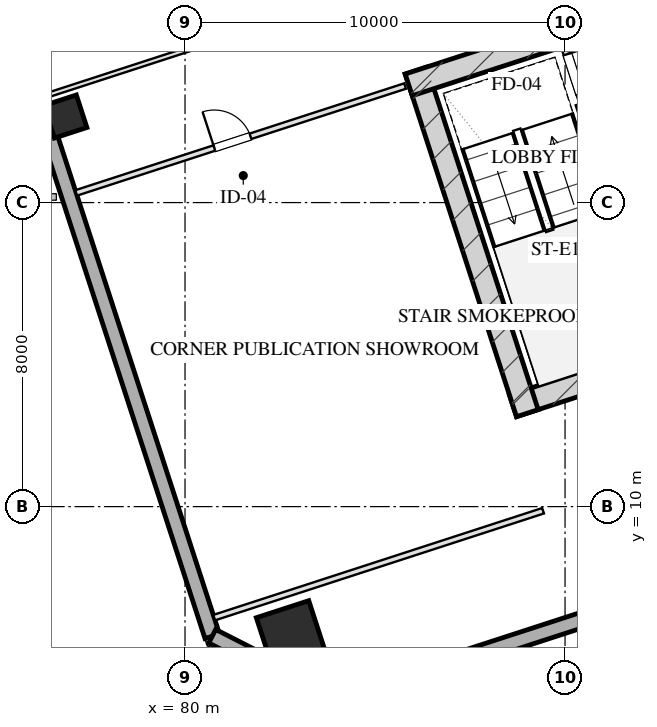
"""IFC4 building model, lengths in metres.
Left out: names, types, materials, properties, quantities, classifications, styles, units other than length and angle.
Written with IfcOpenShell. Run it as: python <this file> out.ifc"""

import sys

from ifc_helpers import new_model, si_unit, direction, frame, frame_2d, origin, origin_2d, place, context, subcontext, project, spatial, rectangle, hollow_rectangle, extrude, element, fill, save


model = new_model("IFC4")
c1 = context("Model", 3, precision=1e-05, world=origin(), true_north=direction((0.0, 1.0)))
c2 = subcontext(c1, "Body", "Model", "MODEL_VIEW")
j1 = project(units=[si_unit("LENGTHUNIT", "METRE"), si_unit("PLANEANGLEUNIT", "RADIAN")], contexts=[c1])
p1 = place(None, origin())
s1 = spatial("IfcSite", under=j1, at=p1, CompositionType="ELEMENT")
p2 = place(p1, origin())
s2 = spatial("IfcBuilding", under=s1, at=p2, CompositionType="ELEMENT")
p3 = place(p2, frame((0.0, 0.0, 120.75)))
s3 = spatial("IfcBuildingStorey", under=s2, at=p3, CompositionType="ELEMENT", Elevation=120.75)
p4 = place(p3, frame((88.63, 12.652, 0.0), z_axis=(0.0, 0.0, 1.0), x_axis=(0.95105714907, 0.309015046886, 0.0)))
e1 = element("IfcWall", 1, at=p4, inside=s3, PredefinedType="SHEAR", context=c2, shape_type="SweptSolid", body=[
    extrude(rectangle(XDim=16.4, YDim=0.6, at=frame_2d((8.2, 0.0))), origin(), (0.0, 0.0, 1.0), 3.45),
])
p5 = place(p3, frame((86.078, 21.475, 0.0), z_axis=(0.0, 0.0, 1.0), x_axis=(0.309017938678, -0.951056209472, 0.0)))
e2 = element("IfcWall", 2, at=p5, inside=s3, PredefinedType="SHEAR", context=c2, shape_type="SweptSolid", body=[
    extrude(rectangle(XDim=9.48, YDim=0.6, at=frame_2d((4.74, 0.0))), origin(), (0.0, 0.0, 1.0), 3.45),
])
p6 = place(p3, frame((85.886, 21.097, 0.0), z_axis=(0.0, 0.0, 1.0), x_axis=(0.951068073652, 0.308981422225, 0.0)))
e3 = element("IfcWall", 3, at=p6, inside=s3, PredefinedType="SHEAR", context=c2, shape_type="SweptSolid", body=[
    extrude(rectangle(XDim=4.22, YDim=0.6, at=frame_2d((2.11, 0.0))), origin(), (0.0, 0.0, 1.0), 3.45),
])
p7 = place(p3, frame((82.791, 6.612, 0.0), z_axis=(0.0, 0.0, 1.0), x_axis=(0.951056516295, 0.309016994375, 0.0)))
e4 = element("IfcColumn", 4, at=p7, inside=s3, PredefinedType="COLUMN", context=c2, shape_type="SweptSolid", body=[
    extrude(hollow_rectangle(XDim=1.45, YDim=1.45, WallThickness=0.05, at=origin_2d()), origin(), (0.0, 0.0, 1.0), 3.451),
])
p8 = place(p3, frame((76.851, 20.264, 0.0), z_axis=(0.0, 0.0, 1.0), x_axis=(0.951056516295, 0.309016994375, 0.0)))
e5 = element("IfcColumn", 5, at=p8, inside=s3, PredefinedType="COLUMN", context=c2, shape_type="SweptSolid", body=[
    extrude(hollow_rectangle(XDim=0.9, YDim=0.9, WallThickness=0.032, at=origin_2d()), origin(), (0.0, 0.0, 1.0), 3.451),
])
p9 = place(p3, frame((80.716, 6.59, 0.0), z_axis=(0.0, 0.0, 1.0), x_axis=(-0.309017542002, 0.95105633836, 0.0)))
e6 = element("IfcWall", 6, at=p9, inside=s3, PredefinedType="SOLIDWALL", context=c2, shape_type="SweptSolid", body=[
    extrude(rectangle(XDim=46.4, YDim=0.4, at=frame_2d((23.2, 0.0))), origin(), (0.0, 0.0, 1.0), 2.61),
])
p10 = place(p9, frame((15.6, 0.0, 0.75)))
e7 = element("IfcOpeningElement", 7, at=p10, cuts=e6, PredefinedType="OPENING", context=c2, shape_type="SweptSolid", body=[
    extrude(rectangle(XDim=2.4, YDim=1.46, at=frame_2d((1.2, 0.73))), frame((0.0, 0.21, 0.0), z_axis=(0.0, -1.0, 0.0), x_axis=(1.0, 0.0, 0.0)), (0.0, 0.0, 1.0), 0.42),
])
p11 = place(p9, frame((28.45, 0.0, 0.0)))
e8 = element("IfcOpeningElement", 8, at=p11, cuts=e6, PredefinedType="OPENING", context=c2, shape_type="SweptSolid", body=[
    extrude(rectangle(XDim=1.1, YDim=2.15, at=frame_2d((0.55, 1.075))), frame((0.0, 0.21, 0.0), z_axis=(0.0, -1.0, 0.0), x_axis=(1.0, 0.0, 0.0)), (0.0, 0.0, 1.0), 0.42),
])
p12 = place(p3, frame((111.953, 14.005, 0.0), z_axis=(0.0, 0.0, 1.0), x_axis=(-0.95105505922, -0.309021478754, 0.0)))
e9 = element("IfcWall", 9, at=p12, inside=s3, PredefinedType="SOLIDWALL", context=c2, shape_type="SweptSolid", body=[
    extrude(rectangle(XDim=29.4, YDim=0.4, at=frame_2d((14.7, 0.0))), origin(), (0.0, 0.0, 1.0), 2.61),
])
p13 = place(p3, frame((83.992, 4.92, 0.0), z_axis=(0.0, 0.0, 1.0), x_axis=(-0.891001999643, 0.45399937955, 0.0)))
e10 = element("IfcWall", 10, at=p13, inside=s3, PredefinedType="SOLIDWALL", context=c2, shape_type="SweptSolid", body=[
    extrude(rectangle(XDim=3.677, YDim=0.4, at=frame_2d((1.839, 0.0))), origin(), (0.0, 0.0, 1.0), 2.61),
])
p14 = place(p3, frame((89.899, 22.401, 0.0), z_axis=(0.0, 0.0, 1.0), x_axis=(0.308932062672, -0.951084108086, 0.0)))
e11 = element("IfcWall", 11, at=p14, inside=s3, PredefinedType="PARTITIONING", context=c2, shape_type="SweptSolid", body=[
    extrude(rectangle(XDim=1.9, YDim=0.2, at=frame_2d((0.95, 0.0))), origin(), (0.0, 0.0, 1.0), 3.175),
])
p15 = place(p14, frame((0.52, 0.0, 0.0)))
e12 = element("IfcOpeningElement", 12, at=p15, cuts=e11, PredefinedType="OPENING", context=c2, shape_type="SweptSolid", body=[
    extrude(rectangle(XDim=1.1, YDim=2.05, at=frame_2d((0.55, 1.025))), frame((0.0, 0.11, 0.0), z_axis=(0.0, -1.0, 0.0), x_axis=(1.0, 0.0, 0.0)), (0.0, 0.0, 1.0), 0.22),
])
p16 = place(p3, frame((80.767, 7.079, 0.0), z_axis=(0.0, 0.0, 1.0), x_axis=(0.951057133767, 0.309015093986, 0.0)))
e13 = element("IfcWall", 13, at=p16, inside=s3, PredefinedType="PARTITIONING", context=c2, shape_type="SweptSolid", body=[
    extrude(rectangle(XDim=9.1, YDim=0.15, at=frame_2d((4.55, 0.0))), origin(), (0.0, 0.0, 1.0), 3.175),
])
p17 = place(p3, frame((77.136, 18.254, 0.0), z_axis=(0.0, 0.0, 1.0), x_axis=(0.951057133767, 0.309015093986, 0.0)))
e14 = element("IfcWall", 14, at=p17, inside=s3, PredefinedType="PARTITIONING", context=c2, shape_type="SweptSolid", body=[
    extrude(rectangle(XDim=9.1, YDim=0.15, at=frame_2d((4.55, 0.0))), origin(), (0.0, 0.0, 1.0), 3.175),
])
p18 = place(p17, frame((3.822, 0.0, 0.0)))
e15 = element("IfcOpeningElement", 15, at=p18, cuts=e14, PredefinedType="OPENING", context=c2, shape_type="SweptSolid", body=[
    extrude(rectangle(XDim=1.0, YDim=2.05, at=frame_2d((0.5, 1.025))), frame((0.0, 0.085, 0.0), z_axis=(0.0, -1.0, 0.0), x_axis=(1.0, 0.0, 0.0)), (0.0, 0.0, 1.0), 0.17),
])
p19 = place(p3, frame((76.308, 20.803, 0.0), z_axis=(0.0, 0.0, 1.0), x_axis=(0.951054001411, 0.309024734286, 0.0)))
e16 = element("IfcWall", 16, at=p19, inside=s3, PredefinedType="PARTITIONING", context=c2, shape_type="SweptSolid", body=[
    extrude(rectangle(XDim=9.0, YDim=0.12, at=frame_2d((4.5, 0.0))), origin(), (0.0, 0.0, 1.0), 3.175),
])
p20 = place(p15, origin())
e17 = element("IfcDoor", 17, at=p20, inside=s3, OperationType="SINGLE_SWING_LEFT", PredefinedType="DOOR", context=c2, shape_type="SweptSolid", body=[
    extrude(rectangle(XDim=1.1, YDim=2.05, at=frame_2d((0.55, 1.025))), frame((0.0, 0.025, 0.0), z_axis=(0.0, -1.0, 0.0), x_axis=(1.0, 0.0, 0.0)), (0.0, 0.0, 1.0), 0.05),
])
fill(e12, e17)
p21 = place(p18, origin())
e18 = element("IfcDoor", 18, at=p21, inside=s3, OperationType="SINGLE_SWING_LEFT", PredefinedType="DOOR", context=c2, shape_type="SweptSolid", body=[
    extrude(rectangle(XDim=1.0, YDim=2.05, at=frame_2d((0.5, 1.025))), frame((0.0, 0.025, 0.0), z_axis=(0.0, -1.0, 0.0), x_axis=(1.0, 0.0, 0.0)), (0.0, 0.0, 1.0), 0.05),
])
fill(e15, e18)
save(model, sys.argv[1])
